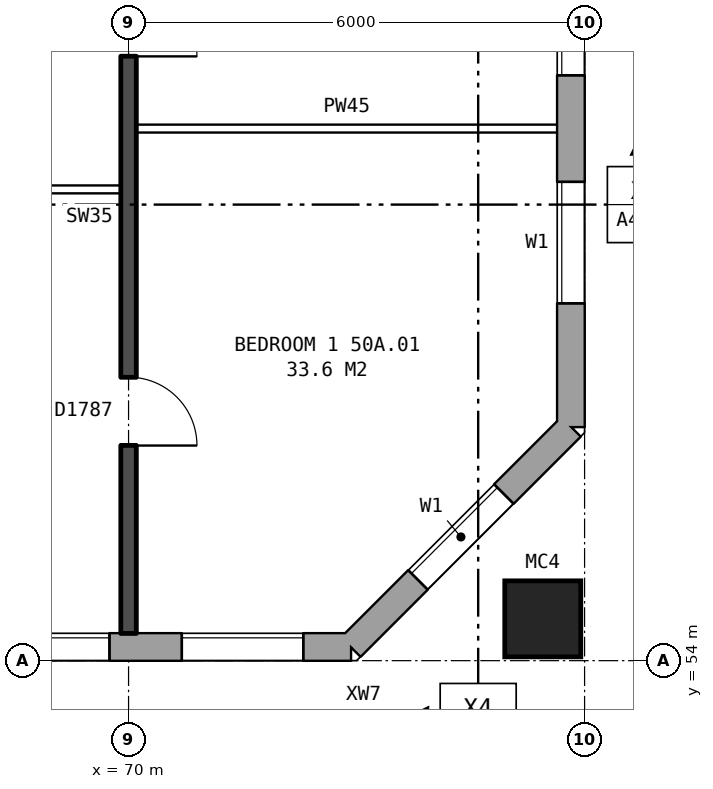
"""IFC4 building model, lengths in metres.
Left out: names, types, materials, properties, quantities, classifications, styles, units other than length and angle.
Written with IfcOpenShell. Run it as: python <this file> out.ifc"""

import sys

from ifc_helpers import new_model, si_unit, direction, frame, frame_2d, origin, origin_2d, place, context, subcontext, project, spatial, rectangle, hollow_rectangle, extrude, element, fill, save


model = new_model("IFC4")
c1 = context("Model", 3, precision=1e-05, world=origin(), true_north=direction((0.0, 1.0)))
c2 = subcontext(c1, "Body", "Model", "MODEL_VIEW")
j1 = project(units=[si_unit("LENGTHUNIT", "METRE"), si_unit("PLANEANGLEUNIT", "RADIAN")], contexts=[c1])
p1 = place(None, origin())
s1 = spatial("IfcSite", under=j1, at=p1, CompositionType="ELEMENT")
p2 = place(p1, origin())
s2 = spatial("IfcBuilding", under=s1, at=p2, CompositionType="ELEMENT")
p3 = place(p2, frame((0.0, 0.0, 178.9)))
s3 = spatial("IfcBuildingStorey", under=s2, at=p3, CompositionType="ELEMENT", Elevation=178.9)
p4 = place(p3, frame((75.45, 54.55, 0.0), z_axis=(0.0, 0.0, 1.0), x_axis=(1.0, 0.0, 0.0)))
e1 = element("IfcColumn", 1, at=p4, inside=s3, PredefinedType="COLUMN", context=c2, shape_type="SweptSolid", body=[
    extrude(hollow_rectangle(XDim=1.0, YDim=1.0, WallThickness=0.055, at=origin_2d()), origin(), (0.0, 0.0, 1.0), 3.1),
])
p5 = place(p3, frame((33.325, 54.18, 0.0), z_axis=(0.0, 0.0, 1.0), x_axis=(1.0, 0.0, 0.0)))
e2 = element("IfcWall", 2, at=p5, inside=s3, PredefinedType="STANDARD", context=c2, shape_type="SweptSolid", body=[
    extrude(rectangle(XDim=39.601, YDim=0.36, at=frame_2d((19.8, 0.0))), origin(), (0.0, 0.0, 1.0), 2.85),
])
p6 = place(p5, frame((1.375, 0.0, 0.8)))
e3 = element("IfcOpeningElement", 3, at=p6, cuts=e2, PredefinedType="OPENING", context=c2, shape_type="SweptSolid", body=[
    extrude(rectangle(XDim=1.6, YDim=1.8, at=frame_2d((0.8, 0.9))), frame((0.0, 0.19, 0.0), z_axis=(0.0, -1.0, 0.0), x_axis=(1.0, 0.0, 0.0)), (0.0, 0.0, 1.0), 0.38),
])
p7 = place(p5, frame((3.275, 0.0, 0.8)))
e4 = element("IfcOpeningElement", 4, at=p7, cuts=e2, PredefinedType="OPENING", context=c2, shape_type="SweptSolid", body=[
    extrude(rectangle(XDim=1.4, YDim=1.8, at=frame_2d((0.7, 0.9))), frame((0.0, 0.19, 0.0), z_axis=(0.0, -1.0, 0.0), x_axis=(1.0, 0.0, 0.0)), (0.0, 0.0, 1.0), 0.38),
])
p8 = place(p5, frame((7.375, 0.0, 0.8)))
e5 = element("IfcOpeningElement", 5, at=p8, cuts=e2, PredefinedType="OPENING", context=c2, shape_type="SweptSolid", body=[
    extrude(rectangle(XDim=1.6, YDim=1.8, at=frame_2d((0.8, 0.9))), frame((0.0, 0.19, 0.0), z_axis=(0.0, -1.0, 0.0), x_axis=(1.0, 0.0, 0.0)), (0.0, 0.0, 1.0), 0.38),
])
p9 = place(p5, frame((10.375, 0.0, 0.8)))
e6 = element("IfcOpeningElement", 6, at=p9, cuts=e2, PredefinedType="OPENING", context=c2, shape_type="SweptSolid", body=[
    extrude(rectangle(XDim=1.6, YDim=1.8, at=frame_2d((0.8, 0.9))), frame((0.0, 0.19, 0.0), z_axis=(0.0, -1.0, 0.0), x_axis=(1.0, 0.0, 0.0)), (0.0, 0.0, 1.0), 0.38),
])
p10 = place(p5, frame((13.375, 0.0, 0.8)))
e7 = element("IfcOpeningElement", 7, at=p10, cuts=e2, PredefinedType="OPENING", context=c2, shape_type="SweptSolid", body=[
    extrude(rectangle(XDim=1.6, YDim=1.8, at=frame_2d((0.8, 0.9))), frame((0.0, 0.19, 0.0), z_axis=(0.0, -1.0, 0.0), x_axis=(1.0, 0.0, 0.0)), (0.0, 0.0, 1.0), 0.38),
])
p11 = place(p5, frame((16.375, 0.0, 0.8)))
e8 = element("IfcOpeningElement", 8, at=p11, cuts=e2, PredefinedType="OPENING", context=c2, shape_type="SweptSolid", body=[
    extrude(rectangle(XDim=1.6, YDim=1.8, at=frame_2d((0.8, 0.9))), frame((0.0, 0.19, 0.0), z_axis=(0.0, -1.0, 0.0), x_axis=(1.0, 0.0, 0.0)), (0.0, 0.0, 1.0), 0.38),
])
p12 = place(p5, frame((19.375, 0.0, 0.8)))
e9 = element("IfcOpeningElement", 9, at=p12, cuts=e2, PredefinedType="OPENING", context=c2, shape_type="SweptSolid", body=[
    extrude(rectangle(XDim=1.6, YDim=1.8, at=frame_2d((0.8, 0.9))), frame((0.0, 0.19, 0.0), z_axis=(0.0, -1.0, 0.0), x_axis=(1.0, 0.0, 0.0)), (0.0, 0.0, 1.0), 0.38),
])
p13 = place(p5, frame((22.375, 0.0, 0.8)))
e10 = element("IfcOpeningElement", 10, at=p13, cuts=e2, PredefinedType="OPENING", context=c2, shape_type="SweptSolid", body=[
    extrude(rectangle(XDim=1.6, YDim=1.8, at=frame_2d((0.8, 0.9))), frame((0.0, 0.19, 0.0), z_axis=(0.0, -1.0, 0.0), x_axis=(1.0, 0.0, 0.0)), (0.0, 0.0, 1.0), 0.38),
])
p14 = place(p5, frame((25.375, 0.0, 0.8)))
e11 = element("IfcOpeningElement", 11, at=p14, cuts=e2, PredefinedType="OPENING", context=c2, shape_type="SweptSolid", body=[
    extrude(rectangle(XDim=1.6, YDim=1.8, at=frame_2d((0.8, 0.9))), frame((0.0, 0.19, 0.0), z_axis=(0.0, -1.0, 0.0), x_axis=(1.0, 0.0, 0.0)), (0.0, 0.0, 1.0), 0.38),
])
p15 = place(p5, frame((28.375, 0.0, 0.8)))
e12 = element("IfcOpeningElement", 12, at=p15, cuts=e2, PredefinedType="OPENING", context=c2, shape_type="SweptSolid", body=[
    extrude(rectangle(XDim=1.6, YDim=1.8, at=frame_2d((0.8, 0.9))), frame((0.0, 0.19, 0.0), z_axis=(0.0, -1.0, 0.0), x_axis=(1.0, 0.0, 0.0)), (0.0, 0.0, 1.0), 0.38),
])
p16 = place(p5, frame((30.875, 0.0, 0.8)))
e13 = element("IfcOpeningElement", 13, at=p16, cuts=e2, PredefinedType="OPENING", context=c2, shape_type="SweptSolid", body=[
    extrude(rectangle(XDim=1.0, YDim=1.8, at=frame_2d((0.5, 0.9))), frame((0.0, 0.19, 0.0), z_axis=(0.0, -1.0, 0.0), x_axis=(1.0, 0.0, 0.0)), (0.0, 0.0, 1.0), 0.38),
])
p17 = place(p5, frame((32.175, 0.0, 0.8)))
e14 = element("IfcOpeningElement", 14, at=p17, cuts=e2, PredefinedType="OPENING", context=c2, shape_type="SweptSolid", body=[
    extrude(rectangle(XDim=0.6, YDim=0.9, at=frame_2d((0.3, 0.45))), frame((0.0, 0.19, 0.0), z_axis=(0.0, -1.0, 0.0), x_axis=(1.0, 0.0, 0.0)), (0.0, 0.0, 1.0), 0.38),
])
p18 = place(p5, frame((37.375, 0.0, 0.8)))
e15 = element("IfcOpeningElement", 15, at=p18, cuts=e2, PredefinedType="OPENING", context=c2, shape_type="SweptSolid", body=[
    extrude(rectangle(XDim=1.6, YDim=1.8, at=frame_2d((0.8, 0.9))), frame((0.0, 0.19, 0.0), z_axis=(0.0, -1.0, 0.0), x_axis=(1.0, 0.0, 0.0)), (0.0, 0.0, 1.0), 0.38),
])
p19 = place(p5, frame((4.975, 0.0, 1.6)))
e16 = element("IfcOpeningElement", 16, at=p19, cuts=e2, PredefinedType="OPENING", context=c2, shape_type="SweptSolid", body=[
    extrude(rectangle(XDim=0.6, YDim=0.9, at=frame_2d((0.3, 0.45))), frame((0.0, 0.19, 0.0), z_axis=(0.0, -1.0, 0.0), x_axis=(1.0, 0.0, 0.0)), (0.0, 0.0, 1.0), 0.38),
])
p20 = place(p5, frame((33.925, 0.0, 1.7)))
e17 = element("IfcOpeningElement", 17, at=p20, cuts=e2, PredefinedType="OPENING", context=c2, shape_type="SweptSolid", body=[
    extrude(rectangle(XDim=0.6, YDim=0.9, at=frame_2d((0.3, 0.45))), frame((0.0, 0.19, 0.0), z_axis=(0.0, -1.0, 0.0), x_axis=(1.0, 0.0, 0.0)), (0.0, 0.0, 1.0), 0.38),
])
p21 = place(p5, frame((34.825, 0.0, 0.8)))
e18 = element("IfcOpeningElement", 18, at=p21, cuts=e2, PredefinedType="OPENING", context=c2, shape_type="SweptSolid", body=[
    extrude(rectangle(XDim=1.6, YDim=1.8, at=frame_2d((0.8, 0.9))), frame((0.0, 0.19, 0.0), z_axis=(0.0, -1.0, 0.0), x_axis=(1.0, 0.0, 0.0)), (0.0, 0.0, 1.0), 0.38),
])
p22 = place(p3, frame((72.925, 54.18, 0.0), z_axis=(0.0, 0.0, 1.0), x_axis=(0.707106781187, 0.707106781187, 0.0)))
e19 = element("IfcWall", 19, at=p22, inside=s3, PredefinedType="STANDARD", context=c2, shape_type="SweptSolid", body=[
    extrude(rectangle(XDim=4.094, YDim=0.36, at=frame_2d((2.047, 0.0))), origin(), (0.0, 0.0, 1.0), 2.85),
])
p23 = place(p22, frame((1.247, 0.0, 0.8)))
e20 = element("IfcOpeningElement", 20, at=p23, cuts=e19, PredefinedType="OPENING", context=c2, shape_type="SweptSolid", body=[
    extrude(rectangle(XDim=1.6, YDim=1.8, at=frame_2d((0.8, 0.9))), frame((0.0, 0.19, 0.0), z_axis=(0.0, -1.0, 0.0), x_axis=(1.0, 0.0, 0.0)), (0.0, 0.0, 1.0), 0.38),
])
p24 = place(p3, frame((75.82, 57.075, 0.0), z_axis=(0.0, 0.0, 1.0), x_axis=(0.0, 1.0, 0.0)))
e21 = element("IfcWall", 21, at=p24, inside=s3, PredefinedType="STANDARD", context=c2, shape_type="SweptSolid", body=[
    extrude(rectangle(XDim=25.851, YDim=0.36, at=frame_2d((12.925, 0.0))), origin(), (0.0, 0.0, 1.0), 2.85),
])
p25 = place(p24, frame((1.625, 0.0, 0.8)))
e22 = element("IfcOpeningElement", 22, at=p25, cuts=e21, PredefinedType="OPENING", context=c2, shape_type="SweptSolid", body=[
    extrude(rectangle(XDim=1.6, YDim=1.8, at=frame_2d((0.8, 0.9))), frame((0.0, 0.19, 0.0), z_axis=(0.0, -1.0, 0.0), x_axis=(1.0, 0.0, 0.0)), (0.0, 0.0, 1.0), 0.38),
])
p26 = place(p24, frame((4.625, 0.0, 0.8)))
e23 = element("IfcOpeningElement", 23, at=p26, cuts=e21, PredefinedType="OPENING", context=c2, shape_type="SweptSolid", body=[
    extrude(rectangle(XDim=1.6, YDim=1.8, at=frame_2d((0.8, 0.9))), frame((0.0, 0.19, 0.0), z_axis=(0.0, -1.0, 0.0), x_axis=(1.0, 0.0, 0.0)), (0.0, 0.0, 1.0), 0.38),
])
p27 = place(p24, frame((19.625, 0.0, 0.8)))
e24 = element("IfcOpeningElement", 24, at=p27, cuts=e21, PredefinedType="OPENING", context=c2, shape_type="SweptSolid", body=[
    extrude(rectangle(XDim=1.6, YDim=1.8, at=frame_2d((0.8, 0.9))), frame((0.0, 0.19, 0.0), z_axis=(0.0, -1.0, 0.0), x_axis=(1.0, 0.0, 0.0)), (0.0, 0.0, 1.0), 0.38),
])
p28 = place(p24, frame((22.625, 0.0, 0.8)))
e25 = element("IfcOpeningElement", 25, at=p28, cuts=e21, PredefinedType="OPENING", context=c2, shape_type="SweptSolid", body=[
    extrude(rectangle(XDim=1.6, YDim=1.8, at=frame_2d((0.8, 0.9))), frame((0.0, 0.19, 0.0), z_axis=(0.0, -1.0, 0.0), x_axis=(1.0, 0.0, 0.0)), (0.0, 0.0, 1.0), 0.38),
])
p29 = place(p3, frame((64.1, 60.2, 0.0), z_axis=(0.0, 0.0, 1.0), x_axis=(1.0, 0.0, 0.0)))
e26 = element("IfcWall", 26, at=p29, inside=s3, PredefinedType="PARTITIONING", context=c2, shape_type="SweptSolid", body=[
    extrude(rectangle(XDim=5.8, YDim=0.1, at=frame_2d((2.9, 0.0))), origin(), (0.0, 0.0, 1.0), 2.85),
])
p30 = place(p29, frame((3.6, 0.0, 0.0)))
e27 = element("IfcOpeningElement", 27, at=p30, cuts=e26, PredefinedType="OPENING", context=c2, shape_type="SweptSolid", body=[
    extrude(rectangle(XDim=0.9, YDim=2.1, at=frame_2d((0.45, 1.05))), frame((0.0, 0.06, 0.0), z_axis=(0.0, -1.0, 0.0), x_axis=(1.0, 0.0, 0.0)), (0.0, 0.0, 1.0), 0.12),
])
p31 = place(p29, frame((0.7, 0.0, 0.0)))
e28 = element("IfcOpeningElement", 28, at=p31, cuts=e26, PredefinedType="OPENING", context=c2, shape_type="SweptSolid", body=[
    extrude(rectangle(XDim=0.9, YDim=2.1, at=frame_2d((0.45, 1.05))), frame((0.0, 0.06, 0.0), z_axis=(0.0, -1.0, 0.0), x_axis=(1.0, 0.0, 0.0)), (0.0, 0.0, 1.0), 0.12),
])
p32 = place(p3, frame((70.1, 61.0, 0.0), z_axis=(0.0, 0.0, 1.0), x_axis=(1.0, 0.0, 0.0)))
e29 = element("IfcWall", 29, at=p32, inside=s3, PredefinedType="PARTITIONING", context=c2, shape_type="SweptSolid", body=[
    extrude(rectangle(XDim=5.54, YDim=0.1, at=frame_2d((2.77, 0.0))), origin(), (0.0, 0.0, 1.0), 2.85),
])
p33 = place(p3, frame((70.0, 54.36, 0.0), z_axis=(0.0, 0.0, 1.0), x_axis=(0.0, 1.0, 0.0)))
e30 = element("IfcWall", 30, at=p33, inside=s3, PredefinedType="SOLIDWALL", context=c2, shape_type="SweptSolid", body=[
    extrude(rectangle(XDim=9.44, YDim=0.2, at=frame_2d((4.72, 0.0))), origin(), (0.0, 0.0, 1.0), 2.85),
])
p34 = place(p33, frame((2.47, 0.0, 0.0)))
e31 = element("IfcOpeningElement", 31, at=p34, cuts=e30, PredefinedType="OPENING", context=c2, shape_type="SweptSolid", body=[
    extrude(rectangle(XDim=0.9, YDim=2.1, at=frame_2d((0.45, 1.05))), frame((0.0, 0.11, 0.0), z_axis=(0.0, -1.0, 0.0), x_axis=(1.0, 0.0, 0.0)), (0.0, 0.0, 1.0), 0.22),
])
p35 = place(p33, frame((7.59, 0.0, 0.0)))
e32 = element("IfcOpeningElement", 32, at=p35, cuts=e30, PredefinedType="OPENING", context=c2, shape_type="SweptSolid", body=[
    extrude(rectangle(XDim=0.9, YDim=2.1, at=frame_2d((0.45, 1.05))), frame((0.0, 0.11, 0.0), z_axis=(0.0, -1.0, 0.0), x_axis=(1.0, 0.0, 0.0)), (0.0, 0.0, 1.0), 0.22),
])
p36 = place(p18, origin())
e33 = element("IfcWindow", 33, at=p36, inside=s3, PartitioningType="SINGLE_PANEL", PredefinedType="WINDOW", context=c2, shape_type="SweptSolid", body=[
    extrude(rectangle(XDim=1.6, YDim=1.8, at=frame_2d((0.8, 0.9))), frame((0.0, 0.15, 0.0), z_axis=(0.0, -1.0, 0.0), x_axis=(1.0, 0.0, 0.0)), (0.0, 0.0, 1.0), 0.06),
])
fill(e15, e33)
p37 = place(p23, origin())
e34 = element("IfcWindow", 34, at=p37, inside=s3, PartitioningType="SINGLE_PANEL", PredefinedType="WINDOW", context=c2, shape_type="SweptSolid", body=[
    extrude(rectangle(XDim=1.6, YDim=1.8, at=frame_2d((0.8, 0.9))), frame((0.0, 0.15, 0.0), z_axis=(0.0, -1.0, 0.0), x_axis=(1.0, 0.0, 0.0)), (0.0, 0.0, 1.0), 0.06),
])
fill(e20, e34)
p38 = place(p25, origin())
e35 = element("IfcWindow", 35, at=p38, inside=s3, PartitioningType="SINGLE_PANEL", PredefinedType="WINDOW", context=c2, shape_type="SweptSolid", body=[
    extrude(rectangle(XDim=1.6, YDim=1.8, at=frame_2d((0.8, 0.9))), frame((0.0, 0.15, 0.0), z_axis=(0.0, -1.0, 0.0), x_axis=(1.0, 0.0, 0.0)), (0.0, 0.0, 1.0), 0.06),
])
fill(e22, e35)
p39 = place(p26, origin())
e36 = element("IfcWindow", 36, at=p39, inside=s3, PartitioningType="SINGLE_PANEL", PredefinedType="WINDOW", context=c2, shape_type="SweptSolid", body=[
    extrude(rectangle(XDim=1.6, YDim=1.8, at=frame_2d((0.8, 0.9))), frame((0.0, 0.15, 0.0), z_axis=(0.0, -1.0, 0.0), x_axis=(1.0, 0.0, 0.0)), (0.0, 0.0, 1.0), 0.06),
])
fill(e23, e36)
p40 = place(p34, frame((0.9, 0.0, 0.0), z_axis=(0.0, 0.0, 1.0), x_axis=(-1.0, 0.0, 0.0)))
e37 = element("IfcDoor", 37, at=p40, inside=s3, OperationType="SINGLE_SWING_RIGHT", PredefinedType="DOOR", context=c2, shape_type="SweptSolid", body=[
    extrude(rectangle(XDim=0.9, YDim=2.1, at=frame_2d((0.45, 1.05))), frame((0.0, 0.025, 0.0), z_axis=(0.0, -1.0, 0.0), x_axis=(1.0, 0.0, 0.0)), (0.0, 0.0, 1.0), 0.05),
])
fill(e31, e37)
p41 = place(p35, frame((0.9, 0.0, 0.0), z_axis=(0.0, 0.0, 1.0), x_axis=(-1.0, 0.0, 0.0)))
e38 = element("IfcDoor", 38, at=p41, inside=s3, OperationType="SINGLE_SWING_RIGHT", PredefinedType="DOOR", context=c2, shape_type="SweptSolid", body=[
    extrude(rectangle(XDim=0.9, YDim=2.1, at=frame_2d((0.45, 1.05))), frame((0.0, 0.025, 0.0), z_axis=(0.0, -1.0, 0.0), x_axis=(1.0, 0.0, 0.0)), (0.0, 0.0, 1.0), 0.05),
])
fill(e32, e38)
p42 = place(p21, origin())
e39 = element("IfcWindow", 39, at=p42, inside=s3, PartitioningType="SINGLE_PANEL", PredefinedType="WINDOW", context=c2, shape_type="SweptSolid", body=[
    extrude(rectangle(XDim=1.6, YDim=1.8, at=frame_2d((0.8, 0.9))), frame((0.0, 0.15, 0.0), z_axis=(0.0, -1.0, 0.0), x_axis=(1.0, 0.0, 0.0)), (0.0, 0.0, 1.0), 0.06),
])
fill(e18, e39)
save(model, sys.argv[1])
